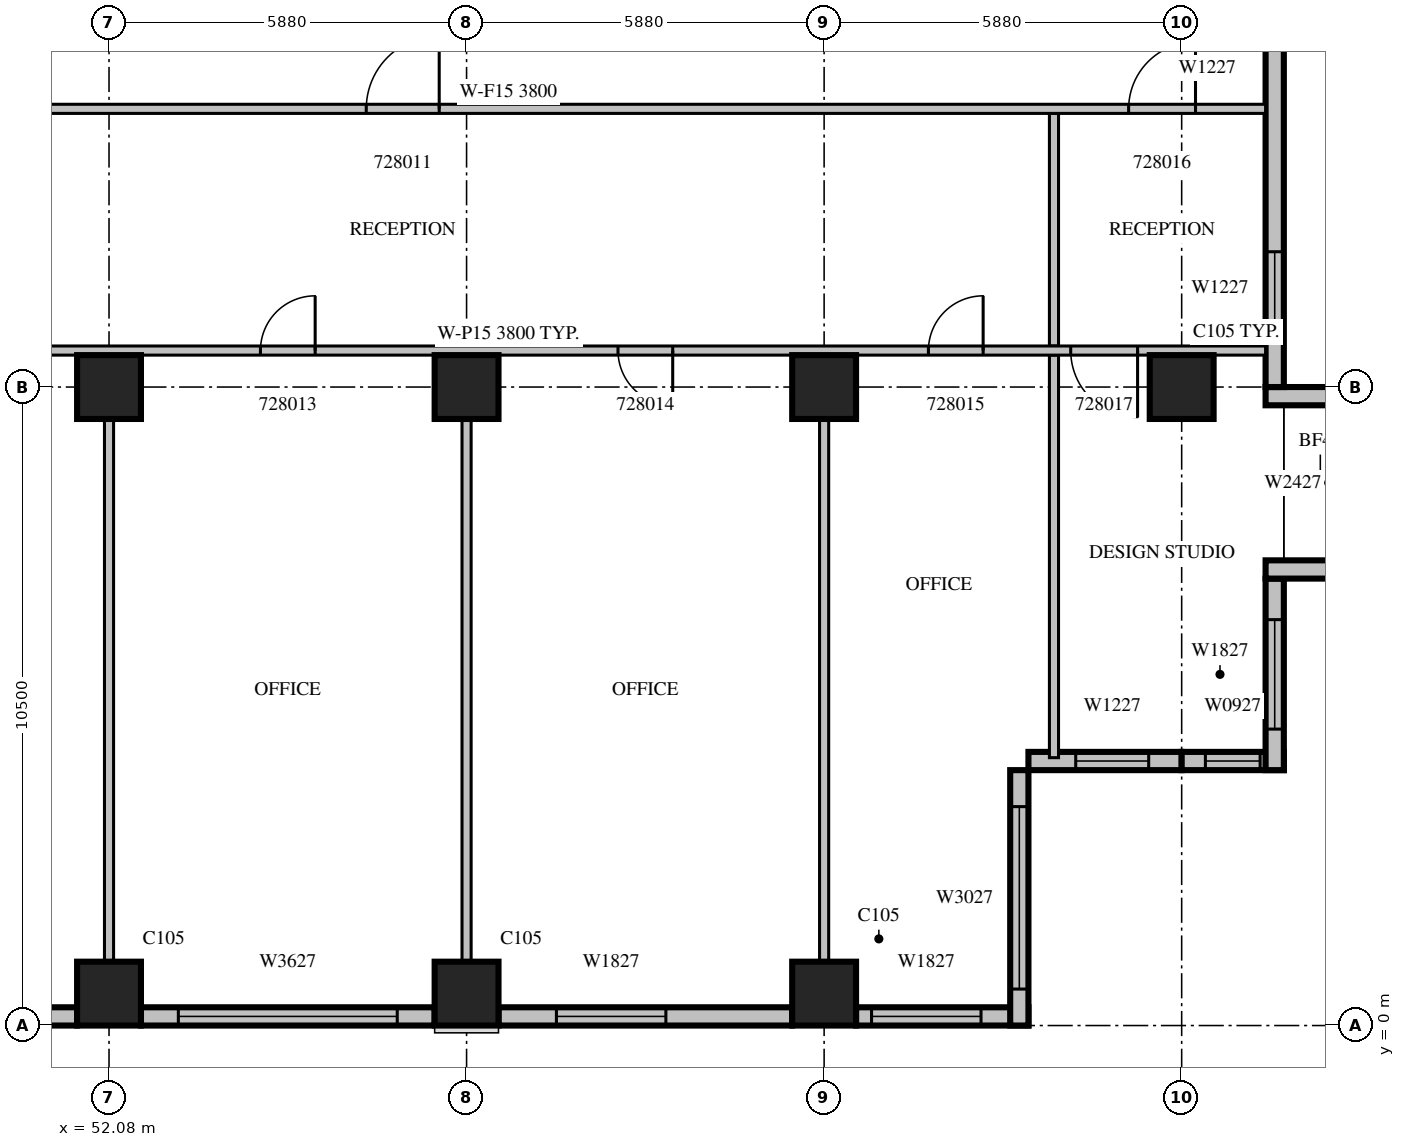
"""IFC4 building model, lengths in metres.
Left out: names, types, materials, properties, quantities, classifications, styles, units other than length and angle.
Written with IfcOpenShell. Run it as: python <this file> out.ifc"""

import sys

from ifc_helpers import new_model, si_unit, direction, frame, frame_2d, origin, origin_2d, place, context, subcontext, project, spatial, rectangle, extrude, source, transform, mapped, element, fill, save


model = new_model("IFC4")
c1 = context("Model", 3, precision=1e-05, world=origin(), true_north=direction((0.0, 1.0)))
c2 = subcontext(c1, "Body", "Model", "MODEL_VIEW")
j1 = project(units=[si_unit("LENGTHUNIT", "METRE"), si_unit("PLANEANGLEUNIT", "RADIAN")], contexts=[c1])
p1 = place(None, origin())
s1 = spatial("IfcSite", under=j1, at=p1, CompositionType="ELEMENT")
p2 = place(p1, origin())
s2 = spatial("IfcBuilding", under=s1, at=p2, CompositionType="ELEMENT")
p3 = place(p2, frame((0.0, 0.0, 128.7)))
s3 = spatial("IfcBuildingStorey", under=s2, at=p3, CompositionType="ELEMENT", Elevation=128.7)
m1 = source(origin(), c2, "Body", "SweptSolid", [
    extrude(rectangle(XDim=1.05, YDim=1.05, at=origin_2d()), origin(), (0.0, 0.0, 1.0), 4.2),
])
for number, where, z_axis, x_axis in (
    (1, (52.08, 0.525, 0.0), (0.0, 0.0, 1.0), (1.0, 0.0, 0.0)),
    (2, (57.96, 0.525, 0.0), (0.0, 0.0, 1.0), (1.0, 0.0, 0.0)),
    (3, (63.84, 0.525, 0.0), (0.0, 0.0, 1.0), (1.0, 0.0, 0.0)),
    (4, (52.08, 10.5, 0.0), (0.0, 0.0, 1.0), (1.0, 0.0, 0.0)),
    (5, (57.96, 10.5, 0.0), (0.0, 0.0, 1.0), (1.0, 0.0, 0.0)),
    (6, (63.84, 10.5, 0.0), (0.0, 0.0, 1.0), (1.0, 0.0, 0.0)),
    (7, (69.72, 10.5, 0.0), (0.0, 0.0, 1.0), (1.0, 0.0, 0.0)),
):
    element("IfcColumn", number, at=place(p3, frame(where, z_axis=z_axis, x_axis=x_axis)), inside=s3, PredefinedType="COLUMN", context=c2, shape_type="MappedRepresentation", body=[
        mapped(m1, transform((0.0, 0.0, 0.0), scale=1.0)),
    ])
m2 = source(origin(), c2, "Body", "SweptSolid", [
    extrude(rectangle(XDim=4.83, YDim=0.3, at=frame_2d((2.415, 0.0))), origin(), (0.0, 0.0, 1.0), 3.3),
])
p4 = place(p3, frame((46.725, 0.15, 0.0), z_axis=(0.0, 0.0, 1.0), x_axis=(1.0, 0.0, 0.0)))
e8 = element("IfcWall", 8, at=p4, inside=s3, PredefinedType="STANDARD", context=c2, shape_type="MappedRepresentation", body=[
    mapped(m2, transform((0.0, 0.0, 0.0), scale=1.0)),
])
m3 = source(origin(), c2, "Body", "SweptSolid", [
    extrude(rectangle(XDim=3.6, YDim=2.7, at=frame_2d((1.8, 1.35))), frame((0.0, 0.16, 0.0), z_axis=(0.0, -1.0, 0.0), x_axis=(1.0, 0.0, 0.0)), (0.0, 0.0, 1.0), 0.32),
])
p5 = place(p4, frame((0.615, 0.0, 0.6)))
e9 = element("IfcOpeningElement", 9, at=p5, cuts=e8, PredefinedType="OPENING", context=c2, shape_type="MappedRepresentation", body=[
    mapped(m3, transform((0.0, 0.0, 0.0), scale=1.0)),
])
m4 = source(origin(), c2, "Body", "SweptSolid", [
    extrude(rectangle(XDim=4.83, YDim=0.3, at=frame_2d((2.415, 0.0))), origin(), (0.0, 0.0, 1.0), 3.8),
])
p6 = place(p3, frame((52.605, 0.15, 0.0), z_axis=(0.0, 0.0, 1.0), x_axis=(1.0, 0.0, 0.0)))
e10 = element("IfcWall", 10, at=p6, inside=s3, PredefinedType="STANDARD", context=c2, shape_type="MappedRepresentation", body=[
    mapped(m4, transform((0.0, 0.0, 0.0), scale=1.0)),
])
p7 = place(p6, frame((0.615, 0.0, 0.6)))
e11 = element("IfcOpeningElement", 11, at=p7, cuts=e10, PredefinedType="OPENING", context=c2, shape_type="MappedRepresentation", body=[
    mapped(m3, transform((0.0, 0.0, 0.0), scale=1.0)),
])
p8 = place(p3, frame((58.485, 0.15, 0.0), z_axis=(0.0, 0.0, 1.0), x_axis=(1.0, 0.0, 0.0)))
e12 = element("IfcWall", 12, at=p8, inside=s3, PredefinedType="STANDARD", context=c2, shape_type="MappedRepresentation", body=[
    mapped(m4, transform((0.0, 0.0, 0.0), scale=1.0)),
])
m5 = source(origin(), c2, "Body", "SweptSolid", [
    extrude(rectangle(XDim=1.8, YDim=2.7, at=frame_2d((0.9, 1.35))), frame((0.0, 0.16, 0.0), z_axis=(0.0, -1.0, 0.0), x_axis=(1.0, 0.0, 0.0)), (0.0, 0.0, 1.0), 0.32),
])
p9 = place(p8, frame((0.953, 0.0, 0.6)))
e13 = element("IfcOpeningElement", 13, at=p9, cuts=e12, PredefinedType="OPENING", context=c2, shape_type="MappedRepresentation", body=[
    mapped(m5, transform((0.0, 0.0, 0.0), scale=1.0)),
])
m6 = source(origin(), c2, "Body", "SweptSolid", [
    extrude(rectangle(XDim=2.835, YDim=0.3, at=frame_2d((1.417, 0.0))), origin(), (0.0, 0.0, 1.0), 3.8),
])
p10 = place(p3, frame((64.365, 0.15, 0.0), z_axis=(0.0, 0.0, 1.0), x_axis=(1.0, 0.0, 0.0)))
e14 = element("IfcWall", 14, at=p10, inside=s3, PredefinedType="STANDARD", context=c2, shape_type="MappedRepresentation", body=[
    mapped(m6, transform((0.0, 0.0, 0.0), scale=1.0)),
])
p11 = place(p10, frame((0.255, 0.0, 0.6)))
e15 = element("IfcOpeningElement", 15, at=p11, cuts=e14, PredefinedType="OPENING", context=c2, shape_type="MappedRepresentation", body=[
    mapped(m5, transform((0.0, 0.0, 0.0), scale=1.0)),
])
m7 = source(origin(), c2, "Body", "SweptSolid", [
    extrude(rectangle(XDim=4.2, YDim=0.3, at=frame_2d((2.1, 0.0))), origin(), (0.0, 0.0, 1.0), 3.8),
])
p12 = place(p3, frame((67.05, 0.0, 0.0), z_axis=(0.0, 0.0, 1.0), x_axis=(0.0, 1.0, 0.0)))
e16 = element("IfcWall", 16, at=p12, inside=s3, PredefinedType="STANDARD", context=c2, shape_type="MappedRepresentation", body=[
    mapped(m7, transform((0.0, 0.0, 0.0), scale=1.0)),
])
m8 = source(origin(), c2, "Body", "SweptSolid", [
    extrude(rectangle(XDim=3.0, YDim=2.7, at=frame_2d((1.5, 1.35))), frame((0.0, 0.16, 0.0), z_axis=(0.0, -1.0, 0.0), x_axis=(1.0, 0.0, 0.0)), (0.0, 0.0, 1.0), 0.32),
])
p13 = place(p12, frame((0.6, 0.0, 0.6)))
e17 = element("IfcOpeningElement", 17, at=p13, cuts=e16, PredefinedType="OPENING", context=c2, shape_type="MappedRepresentation", body=[
    mapped(m8, transform((0.0, 0.0, 0.0), scale=1.0)),
])
m9 = source(origin(), c2, "Body", "SweptSolid", [
    extrude(rectangle(XDim=2.52, YDim=0.3, at=frame_2d((1.26, 0.0))), origin(), (0.0, 0.0, 1.0), 3.8),
])
p14 = place(p3, frame((67.2, 4.35, 0.0), z_axis=(0.0, 0.0, 1.0), x_axis=(1.0, 0.0, 0.0)))
e18 = element("IfcWall", 18, at=p14, inside=s3, PredefinedType="STANDARD", context=c2, shape_type="MappedRepresentation", body=[
    mapped(m9, transform((0.0, 0.0, 0.0), scale=1.0)),
])
m10 = source(origin(), c2, "Body", "SweptSolid", [
    extrude(rectangle(XDim=1.2, YDim=2.7, at=frame_2d((0.6, 1.35))), frame((0.0, 0.16, 0.0), z_axis=(0.0, -1.0, 0.0), x_axis=(1.0, 0.0, 0.0)), (0.0, 0.0, 1.0), 0.32),
])
p15 = place(p14, frame((0.777, 0.0, 0.6)))
e19 = element("IfcOpeningElement", 19, at=p15, cuts=e18, PredefinedType="OPENING", context=c2, shape_type="MappedRepresentation", body=[
    mapped(m10, transform((0.0, 0.0, 0.0), scale=1.0)),
])
m11 = source(origin(), c2, "Body", "SweptSolid", [
    extrude(rectangle(XDim=1.68, YDim=0.3, at=frame_2d((0.84, 0.0))), origin(), (0.0, 0.0, 1.0), 3.8),
])
p16 = place(p3, frame((69.72, 4.35, 0.0), z_axis=(0.0, 0.0, 1.0), x_axis=(1.0, 0.0, 0.0)))
e20 = element("IfcWall", 20, at=p16, inside=s3, PredefinedType="STANDARD", context=c2, shape_type="MappedRepresentation", body=[
    mapped(m11, transform((0.0, 0.0, 0.0), scale=1.0)),
])
m12 = source(origin(), c2, "Body", "SweptSolid", [
    extrude(rectangle(XDim=0.9, YDim=2.7, at=frame_2d((0.45, 1.35))), frame((0.0, 0.16, 0.0), z_axis=(0.0, -1.0, 0.0), x_axis=(1.0, 0.0, 0.0)), (0.0, 0.0, 1.0), 0.32),
])
p17 = place(p16, frame((0.39, 0.0, 0.6)))
e21 = element("IfcOpeningElement", 21, at=p17, cuts=e20, PredefinedType="OPENING", context=c2, shape_type="MappedRepresentation", body=[
    mapped(m12, transform((0.0, 0.0, 0.0), scale=1.0)),
])
m13 = source(origin(), c2, "Body", "SweptSolid", [
    extrude(rectangle(XDim=3.15, YDim=0.3, at=frame_2d((1.575, 0.0))), origin(), (0.0, 0.0, 1.0), 3.8),
])
p18 = place(p3, frame((71.25, 4.2, 0.0), z_axis=(0.0, 0.0, 1.0), x_axis=(0.0, 1.0, 0.0)))
e22 = element("IfcWall", 22, at=p18, inside=s3, PredefinedType="STANDARD", context=c2, shape_type="MappedRepresentation", body=[
    mapped(m13, transform((0.0, 0.0, 0.0), scale=1.0)),
])
p19 = place(p18, frame((0.675, 0.0, 0.6)))
e23 = element("IfcOpeningElement", 23, at=p19, cuts=e22, PredefinedType="OPENING", context=c2, shape_type="MappedRepresentation", body=[
    mapped(m5, transform((0.0, 0.0, 0.0), scale=1.0)),
])
m14 = source(origin(), c2, "Body", "SweptSolid", [
    extrude(rectangle(XDim=1.2, YDim=0.3, at=frame_2d((0.6, 0.0))), origin(), (0.0, 0.0, 1.0), 3.8),
])
for number, where, z_axis, x_axis in (
    (24, (71.1, 7.5, 0.0), (0.0, 0.0, 1.0), (1.0, 0.0, 0.0)),
    (25, (71.1, 10.35, 0.0), (0.0, 0.0, 1.0), (1.0, 0.0, 0.0)),
):
    element("IfcWall", number, at=place(p3, frame(where, z_axis=z_axis, x_axis=x_axis)), inside=s3, PredefinedType="STANDARD", context=c2, shape_type="MappedRepresentation", body=[
        mapped(m14, transform((0.0, 0.0, 0.0), scale=1.0)),
    ])
m15 = source(origin(), c2, "Body", "SweptSolid", [
    extrude(rectangle(XDim=6.3, YDim=0.3, at=frame_2d((3.15, 0.0))), origin(), (0.0, 0.0, 1.0), 3.8),
])
p20 = place(p3, frame((71.25, 10.5, 0.0), z_axis=(0.0, 0.0, 1.0), x_axis=(0.0, 1.0, 0.0)))
e26 = element("IfcWall", 26, at=p20, inside=s3, PredefinedType="STANDARD", context=c2, shape_type="MappedRepresentation", body=[
    mapped(m15, transform((0.0, 0.0, 0.0), scale=1.0)),
])
p21 = place(p20, frame((1.025, 0.0, 0.6)))
e27 = element("IfcOpeningElement", 27, at=p21, cuts=e26, PredefinedType="OPENING", context=c2, shape_type="MappedRepresentation", body=[
    mapped(m10, transform((0.0, 0.0, 0.0), scale=1.0)),
])
m16 = source(origin(), c2, "Body", "SweptSolid", [
    extrude(rectangle(XDim=8.927, YDim=0.15, at=frame_2d((4.463, 0.0))), origin(), (0.0, 0.0, 1.0), 3.8),
])
for number, where, z_axis, x_axis in (
    (28, (52.08, 1.049, 0.0), (0.0, 0.0, 1.0), (0.0, 1.0, 0.0)),
    (29, (57.96, 1.049, 0.0), (0.0, 0.0, 1.0), (0.0, 1.0, 0.0)),
    (30, (63.84, 1.049, 0.0), (0.0, 0.0, 1.0), (0.0, 1.0, 0.0)),
):
    element("IfcWall", number, at=place(p3, frame(where, z_axis=z_axis, x_axis=x_axis)), inside=s3, PredefinedType="PARTITIONING", context=c2, shape_type="MappedRepresentation", body=[
        mapped(m16, transform((0.0, 0.0, 0.0), scale=1.0)),
    ])
m17 = source(origin(), c2, "Body", "SweptSolid", [
    extrude(rectangle(XDim=6.62, YDim=0.15, at=frame_2d((3.31, 0.0))), origin(), (0.0, 0.0, 1.0), 3.8),
])
p22 = place(p3, frame((67.62, 4.405, 0.0), z_axis=(0.0, 0.0, 1.0), x_axis=(0.0, 1.0, 0.0)))
e31 = element("IfcWall", 31, at=p22, inside=s3, PredefinedType="PARTITIONING", context=c2, shape_type="MappedRepresentation", body=[
    mapped(m17, transform((0.0, 0.0, 0.0), scale=1.0)),
])
m18 = source(origin(), c2, "Body", "SweptSolid", [
    extrude(rectangle(XDim=3.825, YDim=0.15, at=frame_2d((1.913, 0.0))), origin(), (0.0, 0.0, 1.0), 3.8),
])
p23 = place(p3, frame((67.62, 11.175, 0.0), z_axis=(0.0, 0.0, 1.0), x_axis=(0.0, 1.0, 0.0)))
e32 = element("IfcWall", 32, at=p23, inside=s3, PredefinedType="PARTITIONING", context=c2, shape_type="MappedRepresentation", body=[
    mapped(m18, transform((0.0, 0.0, 0.0), scale=1.0)),
])
m19 = source(origin(), c2, "Body", "SweptSolid", [
    extrude(rectangle(XDim=24.9, YDim=0.15, at=frame_2d((12.45, 0.0))), origin(), (0.0, 0.0, 1.0), 3.8),
])
p24 = place(p3, frame((71.1, 11.1, 0.0), z_axis=(0.0, 0.0, 1.0), x_axis=(-1.0, 0.0, 0.0)))
e33 = element("IfcWall", 33, at=p24, inside=s3, PredefinedType="PARTITIONING", context=c2, shape_type="MappedRepresentation", body=[
    mapped(m19, transform((0.0, 0.0, 0.0), scale=1.0)),
])
m20 = source(origin(), c2, "Body", "SweptSolid", [
    extrude(rectangle(XDim=0.9, YDim=2.1, at=frame_2d((0.45, 1.05))), frame((0.0, 0.085, 0.0), z_axis=(0.0, -1.0, 0.0), x_axis=(1.0, 0.0, 0.0)), (0.0, 0.0, 1.0), 0.17),
])
p25 = place(p24, frame((21.51, 0.0, 0.0)))
e34 = element("IfcOpeningElement", 34, at=p25, cuts=e33, PredefinedType="OPENING", context=c2, shape_type="MappedRepresentation", body=[
    mapped(m20, transform((0.0, 0.0, 0.0), scale=1.0)),
])
p26 = place(p24, frame((15.63, 0.0, 0.0)))
e35 = element("IfcOpeningElement", 35, at=p26, cuts=e33, PredefinedType="OPENING", context=c2, shape_type="MappedRepresentation", body=[
    mapped(m20, transform((0.0, 0.0, 0.0), scale=1.0)),
])
p27 = place(p24, frame((9.75, 0.0, 0.0)))
e36 = element("IfcOpeningElement", 36, at=p27, cuts=e33, PredefinedType="OPENING", context=c2, shape_type="MappedRepresentation", body=[
    mapped(m20, transform((0.0, 0.0, 0.0), scale=1.0)),
])
p28 = place(p24, frame((4.645, 0.0, 0.0)))
e37 = element("IfcOpeningElement", 37, at=p28, cuts=e33, PredefinedType="OPENING", context=c2, shape_type="MappedRepresentation", body=[
    mapped(m20, transform((0.0, 0.0, 0.0), scale=1.0)),
])
m21 = source(origin(), c2, "Body", "SweptSolid", [
    extrude(rectangle(XDim=1.1, YDim=2.1, at=frame_2d((0.55, 1.05))), frame((0.0, 0.085, 0.0), z_axis=(0.0, -1.0, 0.0), x_axis=(1.0, 0.0, 0.0)), (0.0, 0.0, 1.0), 0.17),
])
p29 = place(p24, frame((2.105, 0.0, 0.0)))
e38 = element("IfcOpeningElement", 38, at=p29, cuts=e33, PredefinedType="OPENING", context=c2, shape_type="MappedRepresentation", body=[
    mapped(m21, transform((0.0, 0.0, 0.0), scale=1.0)),
])
p30 = place(p3, frame((71.1, 15.075, 0.0), z_axis=(0.0, 0.0, 1.0), x_axis=(-1.0, 0.0, 0.0)))
e39 = element("IfcWall", 39, at=p30, inside=s3, PredefinedType="PARTITIONING", context=c2, shape_type="MappedRepresentation", body=[
    mapped(m19, transform((0.0, 0.0, 0.0), scale=1.0)),
])
m22 = source(origin(), c2, "Body", "SweptSolid", [
    extrude(rectangle(XDim=1.2, YDim=2.1, at=frame_2d((0.6, 1.05))), frame((0.0, 0.085, 0.0), z_axis=(0.0, -1.0, 0.0), x_axis=(1.0, 0.0, 0.0)), (0.0, 0.0, 1.0), 0.17),
])
p31 = place(p30, frame((13.59, 0.0, 0.0)))
e40 = element("IfcOpeningElement", 40, at=p31, cuts=e39, PredefinedType="OPENING", context=c2, shape_type="MappedRepresentation", body=[
    mapped(m22, transform((0.0, 0.0, 0.0), scale=1.0)),
])
p32 = place(p30, frame((1.153, 0.0, 0.0)))
e41 = element("IfcOpeningElement", 41, at=p32, cuts=e39, PredefinedType="OPENING", context=c2, shape_type="MappedRepresentation", body=[
    mapped(m21, transform((0.0, 0.0, 0.0), scale=1.0)),
])
m23 = source(origin(), c2, "Body", "SweptSolid", [
    extrude(rectangle(XDim=3.6, YDim=2.7, at=frame_2d((1.8, 1.35))), frame((0.0, 0.03, 0.0), z_axis=(0.0, -1.0, 0.0), x_axis=(1.0, 0.0, 0.0)), (0.0, 0.0, 1.0), 0.06),
])
p33 = place(p7, origin())
e42 = element("IfcWindow", 42, at=p33, inside=s3, PartitioningType="SINGLE_PANEL", PredefinedType="WINDOW", context=c2, shape_type="MappedRepresentation", body=[
    mapped(m23, transform((0.0, 0.0, 0.0), scale=1.0)),
])
fill(e11, e42)
m24 = source(origin(), c2, "Body", "SweptSolid", [
    extrude(rectangle(XDim=1.8, YDim=2.7, at=frame_2d((0.9, 1.35))), frame((0.0, 0.03, 0.0), z_axis=(0.0, -1.0, 0.0), x_axis=(1.0, 0.0, 0.0)), (0.0, 0.0, 1.0), 0.06),
])
p34 = place(p9, origin())
e43 = element("IfcWindow", 43, at=p34, inside=s3, PartitioningType="SINGLE_PANEL", PredefinedType="WINDOW", context=c2, shape_type="MappedRepresentation", body=[
    mapped(m24, transform((0.0, 0.0, 0.0), scale=1.0)),
])
fill(e13, e43)
p35 = place(p11, origin())
e44 = element("IfcWindow", 44, at=p35, inside=s3, PartitioningType="SINGLE_PANEL", PredefinedType="WINDOW", context=c2, shape_type="MappedRepresentation", body=[
    mapped(m24, transform((0.0, 0.0, 0.0), scale=1.0)),
])
fill(e15, e44)
m25 = source(origin(), c2, "Body", "SweptSolid", [
    extrude(rectangle(XDim=3.0, YDim=2.7, at=frame_2d((1.5, 1.35))), frame((0.0, 0.03, 0.0), z_axis=(0.0, -1.0, 0.0), x_axis=(1.0, 0.0, 0.0)), (0.0, 0.0, 1.0), 0.06),
])
p36 = place(p13, origin())
e45 = element("IfcWindow", 45, at=p36, inside=s3, PartitioningType="SINGLE_PANEL", PredefinedType="WINDOW", context=c2, shape_type="MappedRepresentation", body=[
    mapped(m25, transform((0.0, 0.0, 0.0), scale=1.0)),
])
fill(e17, e45)
m26 = source(origin(), c2, "Body", "SweptSolid", [
    extrude(rectangle(XDim=1.2, YDim=2.7, at=frame_2d((0.6, 1.35))), frame((0.0, 0.03, 0.0), z_axis=(0.0, -1.0, 0.0), x_axis=(1.0, 0.0, 0.0)), (0.0, 0.0, 1.0), 0.06),
])
p37 = place(p15, origin())
e46 = element("IfcWindow", 46, at=p37, inside=s3, PartitioningType="SINGLE_PANEL", PredefinedType="WINDOW", context=c2, shape_type="MappedRepresentation", body=[
    mapped(m26, transform((0.0, 0.0, 0.0), scale=1.0)),
])
fill(e19, e46)
m27 = source(origin(), c2, "Body", "SweptSolid", [
    extrude(rectangle(XDim=0.9, YDim=2.7, at=frame_2d((0.45, 1.35))), frame((0.0, 0.03, 0.0), z_axis=(0.0, -1.0, 0.0), x_axis=(1.0, 0.0, 0.0)), (0.0, 0.0, 1.0), 0.06),
])
p38 = place(p17, origin())
e47 = element("IfcWindow", 47, at=p38, inside=s3, PartitioningType="SINGLE_PANEL", PredefinedType="WINDOW", context=c2, shape_type="MappedRepresentation", body=[
    mapped(m27, transform((0.0, 0.0, 0.0), scale=1.0)),
])
fill(e21, e47)
p39 = place(p19, origin())
e48 = element("IfcWindow", 48, at=p39, inside=s3, PartitioningType="SINGLE_PANEL", PredefinedType="WINDOW", context=c2, shape_type="MappedRepresentation", body=[
    mapped(m24, transform((0.0, 0.0, 0.0), scale=1.0)),
])
fill(e23, e48)
p40 = place(p21, origin())
e49 = element("IfcWindow", 49, at=p40, inside=s3, PartitioningType="SINGLE_PANEL", PredefinedType="WINDOW", context=c2, shape_type="MappedRepresentation", body=[
    mapped(m26, transform((0.0, 0.0, 0.0), scale=1.0)),
])
fill(e27, e49)
m28 = source(origin(), c2, "Body", "SweptSolid", [
    extrude(rectangle(XDim=1.2, YDim=2.1, at=frame_2d((0.6, 1.05))), frame((0.0, 0.025, 0.0), z_axis=(0.0, -1.0, 0.0), x_axis=(1.0, 0.0, 0.0)), (0.0, 0.0, 1.0), 0.05),
])
p41 = place(p31, origin())
e50 = element("IfcDoor", 50, at=p41, inside=s3, OperationType="SINGLE_SWING_RIGHT", PredefinedType="DOOR", context=c2, shape_type="MappedRepresentation", body=[
    mapped(m28, transform((0.0, 0.0, 0.0), scale=1.0)),
])
fill(e40, e50)
m29 = source(origin(), c2, "Body", "SweptSolid", [
    extrude(rectangle(XDim=0.9, YDim=2.1, at=frame_2d((0.45, 1.05))), frame((0.0, 0.025, 0.0), z_axis=(0.0, -1.0, 0.0), x_axis=(1.0, 0.0, 0.0)), (0.0, 0.0, 1.0), 0.05),
])
p42 = place(p26, origin())
e51 = element("IfcDoor", 51, at=p42, inside=s3, OperationType="SINGLE_SWING_RIGHT", PredefinedType="DOOR", context=c2, shape_type="MappedRepresentation", body=[
    mapped(m29, transform((0.0, 0.0, 0.0), scale=1.0)),
])
fill(e35, e51)
p43 = place(p27, origin())
e52 = element("IfcDoor", 52, at=p43, inside=s3, OperationType="SINGLE_SWING_LEFT", PredefinedType="DOOR", context=c2, shape_type="MappedRepresentation", body=[
    mapped(m29, transform((0.0, 0.0, 0.0), scale=1.0)),
])
fill(e36, e52)
p44 = place(p28, origin())
e53 = element("IfcDoor", 53, at=p44, inside=s3, OperationType="SINGLE_SWING_RIGHT", PredefinedType="DOOR", context=c2, shape_type="MappedRepresentation", body=[
    mapped(m29, transform((0.0, 0.0, 0.0), scale=1.0)),
])
fill(e37, e53)
m30 = source(origin(), c2, "Body", "SweptSolid", [
    extrude(rectangle(XDim=1.1, YDim=2.1, at=frame_2d((0.55, 1.05))), frame((0.0, 0.025, 0.0), z_axis=(0.0, -1.0, 0.0), x_axis=(1.0, 0.0, 0.0)), (0.0, 0.0, 1.0), 0.05),
])
p45 = place(p32, origin())
e54 = element("IfcDoor", 54, at=p45, inside=s3, OperationType="SINGLE_SWING_RIGHT", PredefinedType="DOOR", context=c2, shape_type="MappedRepresentation", body=[
    mapped(m30, transform((0.0, 0.0, 0.0), scale=1.0)),
])
fill(e41, e54)
p46 = place(p29, origin())
e55 = element("IfcDoor", 55, at=p46, inside=s3, OperationType="SINGLE_SWING_LEFT", PredefinedType="DOOR", context=c2, shape_type="MappedRepresentation", body=[
    mapped(m30, transform((0.0, 0.0, 0.0), scale=1.0)),
])
fill(e38, e55)
save(model, sys.argv[1])
